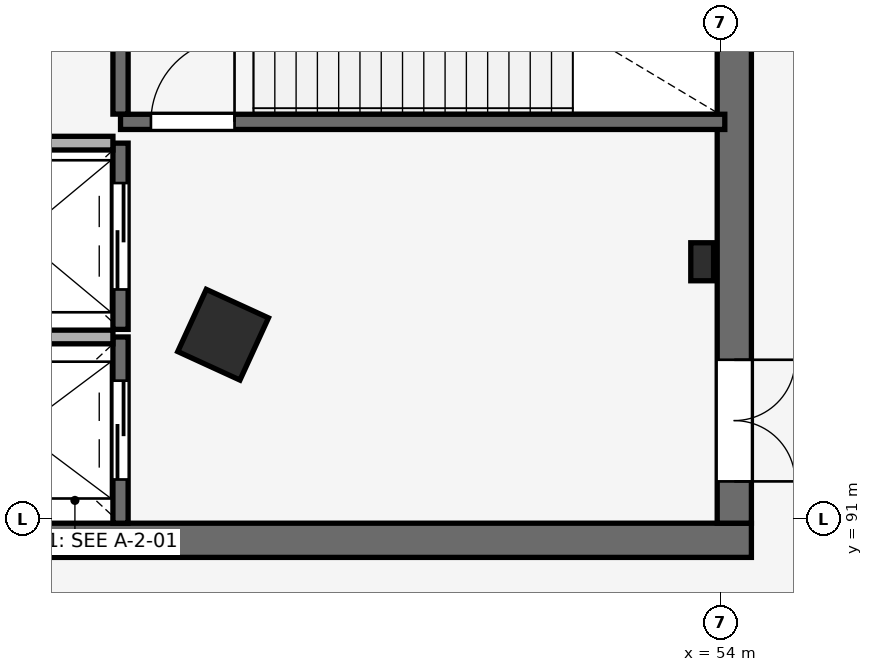
"""IFC4 building model, lengths in metres.
Left out: names, types, materials, properties, quantities, classifications, styles, units other than length and angle.
Written with IfcOpenShell. Run it as: python <this file> out.ifc"""

import sys

from ifc_helpers import new_model, si_unit, direction, frame, frame_2d, origin, origin_2d, place, context, subcontext, project, spatial, rectangle, i_section, extrude, element, fill, save


model = new_model("IFC4")
c1 = context("Model", 3, precision=1e-05, world=origin(), true_north=direction((0.0, 1.0)))
c2 = subcontext(c1, "Body", "Model", "MODEL_VIEW")
j1 = project(units=[si_unit("LENGTHUNIT", "METRE"), si_unit("PLANEANGLEUNIT", "RADIAN")], contexts=[c1])
p1 = place(None, origin())
s1 = spatial("IfcSite", under=j1, at=p1, CompositionType="ELEMENT")
p2 = place(p1, origin())
s2 = spatial("IfcBuilding", under=s1, at=p2, CompositionType="ELEMENT")
p3 = place(p2, origin())
s3 = spatial("IfcBuildingStorey", under=s2, at=p3, CompositionType="ELEMENT", Elevation=0.0)
p4 = place(p3, frame((47.45, 93.43, 0.0), z_axis=(0.0, 0.0, 1.0), x_axis=(-0.909018020308, 0.416756810089, 0.0)))
e1 = element("IfcColumn", 1, at=p4, inside=s3, PredefinedType="COLUMN", context=c2, shape_type="SweptSolid", body=[
    extrude(rectangle(XDim=0.9, YDim=0.9, at=origin_2d()), origin(), (0.0, 0.0, 1.0), 5.4),
])
p5 = place(p3, frame((43.0, 90.725, 0.0), z_axis=(0.0, 0.0, 1.0), x_axis=(1.0, 0.0, 0.0)))
e2 = element("IfcWall", 2, at=p5, inside=s3, PredefinedType="SHEAR", context=c2, shape_type="SweptSolid", body=[
    extrude(rectangle(XDim=11.4, YDim=0.45, at=frame_2d((5.7, 0.0))), origin(), (0.0, 0.0, 1.0), 5.4),
])
p6 = place(p3, frame((54.175, 90.95, 0.0), z_axis=(0.0, 0.0, 1.0), x_axis=(0.0, 1.0, 0.0)))
e3 = element("IfcWall", 3, at=p6, inside=s3, PredefinedType="SHEAR", context=c2, shape_type="SweptSolid", body=[
    extrude(rectangle(XDim=9.1, YDim=0.45, at=frame_2d((4.55, 0.0))), origin(), (0.0, 0.0, 1.0), 5.4),
])
p7 = place(p6, frame((0.55, 0.0, 0.0)))
e4 = element("IfcOpeningElement", 4, at=p7, cuts=e3, PredefinedType="OPENING", context=c2, shape_type="SweptSolid", body=[
    extrude(rectangle(XDim=1.6, YDim=2.2, at=frame_2d((0.8, 1.1))), frame((0.0, 0.235, 0.0), z_axis=(0.0, -1.0, 0.0), x_axis=(1.0, 0.0, 0.0)), (0.0, 0.0, 1.0), 0.47),
])
p8 = place(p3, frame((53.752, 94.389, 0.0), z_axis=(0.0, 0.0, 1.0), x_axis=(1.0, 0.0, 0.0)))
e5 = element("IfcColumn", 5, at=p8, inside=s3, PredefinedType="COLUMN", context=c2, shape_type="SweptSolid", body=[
    extrude(i_section(OverallWidth=0.3, OverallDepth=0.5, WebThickness=0.014, FlangeThickness=0.028, FilletRadius=0.027, at=origin_2d()), origin(), (0.0, 0.0, 1.0), 5.4),
])
p9 = place(p3, frame((46.1, 90.95, 0.0), z_axis=(0.0, 0.0, 1.0), x_axis=(0.0, 1.0, 0.0)))
e6 = element("IfcWall", 6, at=p9, inside=s3, PredefinedType="SHEAR", context=c2, shape_type="SweptSolid", body=[
    extrude(rectangle(XDim=2.45, YDim=0.2, at=frame_2d((1.225, 0.0))), origin(), (0.0, 0.0, 1.0), 5.12),
])
p10 = place(p9, frame((0.575, 0.0, 0.0)))
e7 = element("IfcOpeningElement", 7, at=p10, cuts=e6, PredefinedType="OPENING", context=c2, shape_type="SweptSolid", body=[
    extrude(rectangle(XDim=1.3, YDim=2.2, at=frame_2d((0.65, 1.1))), frame((0.0, 0.11, 0.0), z_axis=(0.0, -1.0, 0.0), x_axis=(1.0, 0.0, 0.0)), (0.0, 0.0, 1.0), 0.22),
])
p11 = place(p3, frame((43.55, 93.4, 0.0), z_axis=(0.0, 0.0, 1.0), x_axis=(1.0, 0.0, 0.0)))
e8 = element("IfcWall", 8, at=p11, inside=s3, PredefinedType="PARTITIONING", context=c2, shape_type="SweptSolid", body=[
    extrude(rectangle(XDim=2.45, YDim=0.18, at=frame_2d((1.225, 0.0))), origin(), (0.0, 0.0, 1.0), 5.4),
])
p12 = place(p3, frame((46.1, 93.5, 0.0), z_axis=(0.0, 0.0, 1.0), x_axis=(0.0, 1.0, 0.0)))
e9 = element("IfcWall", 9, at=p12, inside=s3, PredefinedType="SHEAR", context=c2, shape_type="SweptSolid", body=[
    extrude(rectangle(XDim=2.45, YDim=0.2, at=frame_2d((1.225, 0.0))), origin(), (0.0, 0.0, 1.0), 5.12),
])
p13 = place(p12, frame((0.525, 0.0, 0.0)))
e10 = element("IfcOpeningElement", 10, at=p13, cuts=e9, PredefinedType="OPENING", context=c2, shape_type="SweptSolid", body=[
    extrude(rectangle(XDim=1.4, YDim=2.2, at=frame_2d((0.7, 1.1))), frame((0.0, 0.11, 0.0), z_axis=(0.0, -1.0, 0.0), x_axis=(1.0, 0.0, 0.0)), (0.0, 0.0, 1.0), 0.22),
])
p14 = place(p3, frame((43.55, 95.95, 0.0), z_axis=(0.0, 0.0, 1.0), x_axis=(1.0, 0.0, 0.0)))
e11 = element("IfcWall", 11, at=p14, inside=s3, PredefinedType="PARTITIONING", context=c2, shape_type="SweptSolid", body=[
    extrude(rectangle(XDim=2.45, YDim=0.18, at=frame_2d((1.225, 0.0))), origin(), (0.0, 0.0, 1.0), 5.4),
])
p15 = place(p3, frame((46.1, 96.23, 0.0), z_axis=(0.0, 0.0, 1.0), x_axis=(1.0, 0.0, 0.0)))
e12 = element("IfcWall", 12, at=p15, inside=s3, PredefinedType="SHEAR", context=c2, shape_type="SweptSolid", body=[
    extrude(rectangle(XDim=7.95, YDim=0.2, at=frame_2d((3.975, 0.0))), origin(), (0.0, 0.0, 1.0), 5.4),
])
p16 = place(p15, frame((0.4, 0.0, 0.0)))
e13 = element("IfcOpeningElement", 13, at=p16, cuts=e12, PredefinedType="OPENING", context=c2, shape_type="SweptSolid", body=[
    extrude(rectangle(XDim=1.1, YDim=2.15, at=frame_2d((0.55, 1.075))), frame((0.0, 0.11, 0.0), z_axis=(0.0, -1.0, 0.0), x_axis=(1.0, 0.0, 0.0)), (0.0, 0.0, 1.0), 0.22),
])
p17 = place(p3, frame((46.1, 96.332, 0.0), z_axis=(0.0, 0.0, 1.0), x_axis=(0.0, 1.0, 0.0)))
e14 = element("IfcWall", 14, at=p17, inside=s3, PredefinedType="SHEAR", context=c2, shape_type="SweptSolid", body=[
    extrude(rectangle(XDim=3.686, YDim=0.2, at=frame_2d((1.843, 0.0))), origin(), (0.0, 0.0, 1.0), 5.4),
])
p18 = place(p10, origin())
e15 = element("IfcDoor", 15, at=p18, inside=s3, OperationType="DOUBLE_DOOR_SLIDING", PredefinedType="DOOR", context=c2, shape_type="SweptSolid", body=[
    extrude(rectangle(XDim=1.3, YDim=2.2, at=frame_2d((0.65, 1.1))), frame((0.0, 0.025, 0.0), z_axis=(0.0, -1.0, 0.0), x_axis=(1.0, 0.0, 0.0)), (0.0, 0.0, 1.0), 0.05),
])
fill(e7, e15)
p19 = place(p13, origin())
e16 = element("IfcDoor", 16, at=p19, inside=s3, OperationType="DOUBLE_DOOR_SLIDING", PredefinedType="DOOR", context=c2, shape_type="SweptSolid", body=[
    extrude(rectangle(XDim=1.4, YDim=2.2, at=frame_2d((0.7, 1.1))), frame((0.0, 0.025, 0.0), z_axis=(0.0, -1.0, 0.0), x_axis=(1.0, 0.0, 0.0)), (0.0, 0.0, 1.0), 0.05),
])
fill(e10, e16)
p20 = place(p16, frame((1.1, 0.0, 0.0), z_axis=(0.0, 0.0, 1.0), x_axis=(-1.0, 0.0, 0.0)))
e17 = element("IfcDoor", 17, at=p20, inside=s3, OperationType="SINGLE_SWING_LEFT", PredefinedType="DOOR", context=c2, shape_type="SweptSolid", body=[
    extrude(rectangle(XDim=1.1, YDim=2.15, at=frame_2d((0.55, 1.075))), frame((0.0, 0.025, 0.0), z_axis=(0.0, -1.0, 0.0), x_axis=(1.0, 0.0, 0.0)), (0.0, 0.0, 1.0), 0.05),
])
fill(e13, e17)
p21 = place(p7, frame((1.6, 0.0, 0.0), z_axis=(0.0, 0.0, 1.0), x_axis=(-1.0, 0.0, 0.0)))
e18 = element("IfcDoor", 18, at=p21, inside=s3, OperationType="DOUBLE_DOOR_SINGLE_SWING", PredefinedType="DOOR", context=c2, shape_type="SweptSolid", body=[
    extrude(rectangle(XDim=1.6, YDim=2.2, at=frame_2d((0.8, 1.1))), frame((0.0, 0.025, 0.0), z_axis=(0.0, -1.0, 0.0), x_axis=(1.0, 0.0, 0.0)), (0.0, 0.0, 1.0), 0.05),
])
fill(e4, e18)
save(model, sys.argv[1])
